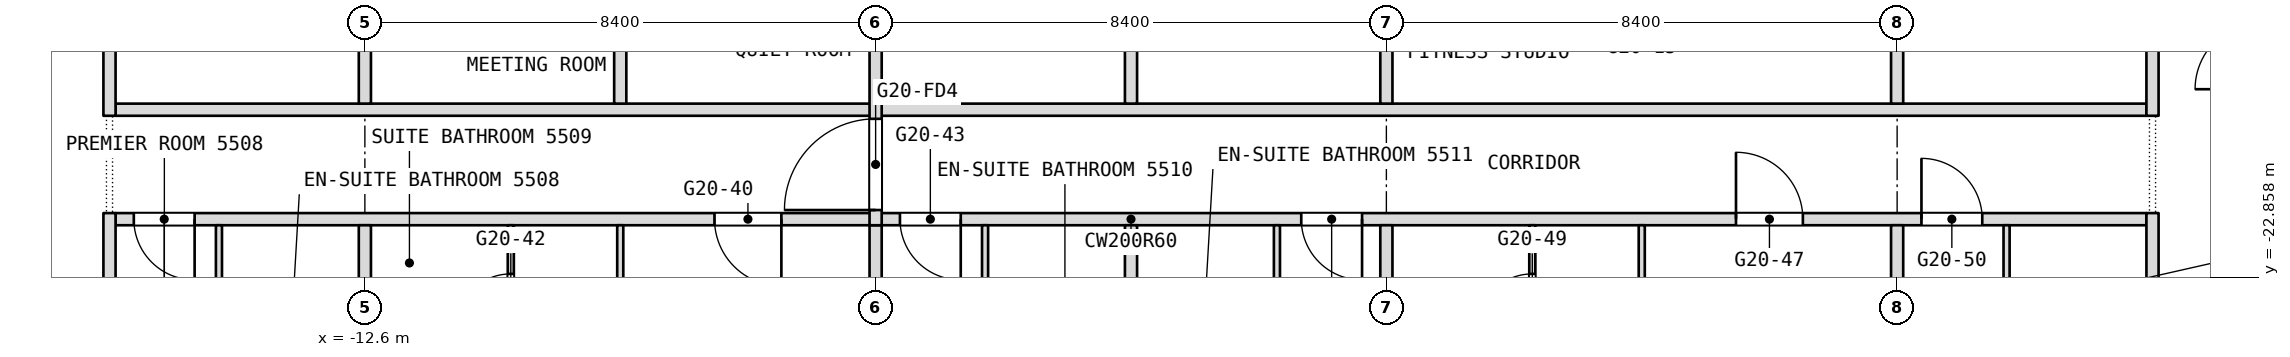
"""IFC4 building model, lengths in metres.
Left out: names, types, materials, properties, quantities, classifications, styles, units other than length and angle.
Written with IfcOpenShell. Run it as: python <this file> out.ifc"""

import sys

from ifc_helpers import new_model, si_unit, direction, frame, frame_2d, origin, place, context, subcontext, project, spatial, rectangle, extrude, element, fill, save


model = new_model("IFC4")
c1 = context("Model", 3, precision=1e-05, world=origin(), true_north=direction((0.0, 1.0)))
c2 = subcontext(c1, "Body", "Model", "MODEL_VIEW")
j1 = project(units=[si_unit("LENGTHUNIT", "METRE"), si_unit("PLANEANGLEUNIT", "RADIAN")], contexts=[c1])
p1 = place(None, origin())
s1 = spatial("IfcSite", under=j1, at=p1, CompositionType="ELEMENT")
p2 = place(p1, origin())
s2 = spatial("IfcBuilding", under=s1, at=p2, CompositionType="ELEMENT")
p3 = place(p2, frame((0.0, 0.0, 234.5)))
s3 = spatial("IfcBuildingStorey", under=s2, at=p3, CompositionType="ELEMENT", Elevation=234.5)
p4 = place(p3, frame((-16.7, -21.9, 0.0), z_axis=(0.0, 0.0, 1.0), x_axis=(1.0, 0.0, 0.0)))
e1 = element("IfcWall", 1, at=p4, inside=s3, PredefinedType="PARTITIONING", context=c2, shape_type="SweptSolid", body=[
    extrude(rectangle(XDim=33.4, YDim=0.2, at=frame_2d((16.7, 0.0))), origin(), (0.0, 0.0, 1.0), 3.34),
])
p5 = place(p4, frame((0.3, 0.0, 0.0)))
e2 = element("IfcOpeningElement", 2, at=p5, cuts=e1, PredefinedType="OPENING", context=c2, shape_type="SweptSolid", body=[
    extrude(rectangle(XDim=1.0, YDim=2.1, at=frame_2d((0.5, 1.05))), frame((0.0, 0.1, 0.0), z_axis=(0.0, -1.0, 0.0), x_axis=(1.0, 0.0, 0.0)), (0.0, 0.0, 1.0), 0.2),
])
p6 = place(p4, frame((9.85, 0.0, 0.0)))
e3 = element("IfcOpeningElement", 3, at=p6, cuts=e1, PredefinedType="OPENING", context=c2, shape_type="SweptSolid", body=[
    extrude(rectangle(XDim=1.1, YDim=2.1, at=frame_2d((0.55, 1.05))), frame((0.0, 0.1, 0.0), z_axis=(0.0, -1.0, 0.0), x_axis=(1.0, 0.0, 0.0)), (0.0, 0.0, 1.0), 0.2),
])
p7 = place(p4, frame((12.9, 0.0, 0.0)))
e4 = element("IfcOpeningElement", 4, at=p7, cuts=e1, PredefinedType="OPENING", context=c2, shape_type="SweptSolid", body=[
    extrude(rectangle(XDim=1.0, YDim=2.1, at=frame_2d((0.5, 1.05))), frame((0.0, 0.1, 0.0), z_axis=(0.0, -1.0, 0.0), x_axis=(1.0, 0.0, 0.0)), (0.0, 0.0, 1.0), 0.2),
])
p8 = place(p4, frame((19.5, 0.0, 0.0)))
e5 = element("IfcOpeningElement", 5, at=p8, cuts=e1, PredefinedType="OPENING", context=c2, shape_type="SweptSolid", body=[
    extrude(rectangle(XDim=1.0, YDim=2.1, at=frame_2d((0.5, 1.05))), frame((0.0, 0.1, 0.0), z_axis=(0.0, -1.0, 0.0), x_axis=(1.0, 0.0, 0.0)), (0.0, 0.0, 1.0), 0.2),
])
p9 = place(p4, frame((26.65, 0.0, 0.0)))
e6 = element("IfcOpeningElement", 6, at=p9, cuts=e1, PredefinedType="OPENING", context=c2, shape_type="SweptSolid", body=[
    extrude(rectangle(XDim=1.1, YDim=2.1, at=frame_2d((0.55, 1.05))), frame((0.0, 0.1, 0.0), z_axis=(0.0, -1.0, 0.0), x_axis=(1.0, 0.0, 0.0)), (0.0, 0.0, 1.0), 0.2),
])
p10 = place(p4, frame((29.7, 0.0, 0.0)))
e7 = element("IfcOpeningElement", 7, at=p10, cuts=e1, PredefinedType="OPENING", context=c2, shape_type="SweptSolid", body=[
    extrude(rectangle(XDim=1.0, YDim=2.1, at=frame_2d((0.5, 1.05))), frame((0.0, 0.1, 0.0), z_axis=(0.0, -1.0, 0.0), x_axis=(1.0, 0.0, 0.0)), (0.0, 0.0, 1.0), 0.2),
])
p11 = place(p3, frame((-16.7, -20.1, 0.0), z_axis=(0.0, 0.0, 1.0), x_axis=(1.0, 0.0, 0.0)))
e8 = element("IfcWall", 8, at=p11, inside=s3, PredefinedType="PARTITIONING", context=c2, shape_type="SweptSolid", body=[
    extrude(rectangle(XDim=33.4, YDim=0.2, at=frame_2d((16.7, 0.0))), origin(), (0.0, 0.0, 1.0), 3.34),
])
p12 = place(p3, frame((16.8, -27.229, 0.0), z_axis=(0.0, 0.0, 1.0), x_axis=(0.0, 1.0, 0.0)))
e9 = element("IfcWall", 9, at=p12, inside=s3, PredefinedType="PARTITIONING", context=c2, shape_type="SweptSolid", body=[
    extrude(rectangle(XDim=5.429, YDim=0.2, at=frame_2d((2.714, 0.0))), origin(), (0.0, 0.0, 1.0), 3.34),
])
p13 = place(p3, frame((16.8, -20.2, 0.0), z_axis=(0.0, 0.0, 1.0), x_axis=(0.0, 1.0, 0.0)))
e10 = element("IfcWall", 10, at=p13, inside=s3, PredefinedType="PARTITIONING", context=c2, shape_type="SweptSolid", body=[
    extrude(rectangle(XDim=6.8, YDim=0.2, at=frame_2d((3.4, 0.0))), origin(), (0.0, 0.0, 1.0), 3.34),
])
p14 = place(p3, frame((14.4, -25.35, 0.0), z_axis=(0.0, 0.0, 1.0), x_axis=(0.0, 1.0, 0.0)))
e11 = element("IfcWall", 11, at=p14, inside=s3, PredefinedType="PARTITIONING", context=c2, shape_type="SweptSolid", body=[
    extrude(rectangle(XDim=3.35, YDim=0.1, at=frame_2d((1.675, 0.0))), origin(), (0.0, 0.0, 1.0), 3.34),
])
p15 = place(p3, frame((12.6, -28.343, 0.0), z_axis=(0.0, 0.0, 1.0), x_axis=(0.0, 1.0, 0.0)))
e12 = element("IfcWall", 12, at=p15, inside=s3, PredefinedType="PARTITIONING", context=c2, shape_type="SweptSolid", body=[
    extrude(rectangle(XDim=6.343, YDim=0.2, at=frame_2d((3.171, 0.0))), origin(), (0.0, 0.0, 1.0), 3.34),
])
p16 = place(p3, frame((12.6, -20.0, 0.0), z_axis=(0.0, 0.0, 1.0), x_axis=(0.0, 1.0, 0.0)))
e13 = element("IfcWall", 13, at=p16, inside=s3, PredefinedType="PARTITIONING", context=c2, shape_type="SweptSolid", body=[
    extrude(rectangle(XDim=1.5, YDim=0.2, at=frame_2d((0.75, 0.0))), origin(), (0.0, 0.0, 1.0), 3.34),
])
p17 = place(p3, frame((8.4, -28.9, 0.0), z_axis=(0.0, 0.0, 1.0), x_axis=(0.0, 1.0, 0.0)))
e14 = element("IfcWall", 14, at=p17, inside=s3, PredefinedType="PARTITIONING", context=c2, shape_type="SweptSolid", body=[
    extrude(rectangle(XDim=6.9, YDim=0.1, at=frame_2d((3.45, 0.0))), origin(), (0.0, 0.0, 1.0), 3.34),
])
p18 = place(p17, frame((2.53, 0.0, 0.0)))
e15 = element("IfcOpeningElement", 15, at=p18, cuts=e14, PredefinedType="OPENING", context=c2, shape_type="SweptSolid", body=[
    extrude(rectangle(XDim=0.9, YDim=2.1, at=frame_2d((0.45, 1.05))), frame((0.0, 0.05, 0.0), z_axis=(0.0, -1.0, 0.0), x_axis=(1.0, 0.0, 0.0)), (0.0, 0.0, 1.0), 0.1),
])
p19 = place(p3, frame((6.6, -24.55, 0.0), z_axis=(0.0, 0.0, 1.0), x_axis=(0.0, 1.0, 0.0)))
e16 = element("IfcWall", 16, at=p19, inside=s3, PredefinedType="PARTITIONING", context=c2, shape_type="SweptSolid", body=[
    extrude(rectangle(XDim=2.55, YDim=0.1, at=frame_2d((1.275, 0.0))), origin(), (0.0, 0.0, 1.0), 3.34),
])
p20 = place(p19, frame((0.85, 0.0, 0.0)))
e17 = element("IfcOpeningElement", 17, at=p20, cuts=e16, PredefinedType="OPENING", context=c2, shape_type="SweptSolid", body=[
    extrude(rectangle(XDim=0.9, YDim=2.1, at=frame_2d((0.45, 1.05))), frame((0.0, 0.05, 0.0), z_axis=(0.0, -1.0, 0.0), x_axis=(1.0, 0.0, 0.0)), (0.0, 0.0, 1.0), 0.1),
])
p21 = place(p3, frame((4.2, -28.9, 0.0), z_axis=(0.0, 0.0, 1.0), x_axis=(0.0, 1.0, 0.0)))
e18 = element("IfcWall", 18, at=p21, inside=s3, PredefinedType="PARTITIONING", context=c2, shape_type="SweptSolid", body=[
    extrude(rectangle(XDim=6.9, YDim=0.2, at=frame_2d((3.45, 0.0))), origin(), (0.0, 0.0, 1.0), 3.34),
])
p22 = place(p3, frame((4.2, -20.0, 0.0), z_axis=(0.0, 0.0, 1.0), x_axis=(0.0, 1.0, 0.0)))
e19 = element("IfcWall", 19, at=p22, inside=s3, PredefinedType="PARTITIONING", context=c2, shape_type="SweptSolid", body=[
    extrude(rectangle(XDim=6.4, YDim=0.2, at=frame_2d((3.2, 0.0))), origin(), (0.0, 0.0, 1.0), 3.34),
])
p23 = place(p3, frame((2.4, -25.25, 0.0), z_axis=(0.0, 0.0, 1.0), x_axis=(0.0, 1.0, 0.0)))
e20 = element("IfcWall", 20, at=p23, inside=s3, PredefinedType="PARTITIONING", context=c2, shape_type="SweptSolid", body=[
    extrude(rectangle(XDim=3.25, YDim=0.1, at=frame_2d((1.625, 0.0))), origin(), (0.0, 0.0, 1.0), 3.34),
])
p24 = place(p3, frame((0.0, -28.9, 0.0), z_axis=(0.0, 0.0, 1.0), x_axis=(0.0, 1.0, 0.0)))
e21 = element("IfcWall", 21, at=p24, inside=s3, PredefinedType="PARTITIONING", context=c2, shape_type="SweptSolid", body=[
    extrude(rectangle(XDim=6.9, YDim=0.2, at=frame_2d((3.45, 0.0))), origin(), (0.0, 0.0, 1.0), 3.34),
])
p25 = place(p3, frame((0.0, -20.0, 0.0), z_axis=(0.0, 0.0, 1.0), x_axis=(0.0, 1.0, 0.0)))
e22 = element("IfcWall", 22, at=p25, inside=s3, PredefinedType="PARTITIONING", context=c2, shape_type="SweptSolid", body=[
    extrude(rectangle(XDim=6.4, YDim=0.2, at=frame_2d((3.2, 0.0))), origin(), (0.0, 0.0, 1.0), 3.34),
])
p26 = place(p3, frame((-2.4, -24.95, 0.0), z_axis=(0.0, 0.0, 1.0), x_axis=(0.0, 1.0, 0.0)))
e23 = element("IfcWall", 23, at=p26, inside=s3, PredefinedType="PARTITIONING", context=c2, shape_type="SweptSolid", body=[
    extrude(rectangle(XDim=2.95, YDim=0.1, at=frame_2d((1.475, 0.0))), origin(), (0.0, 0.0, 1.0), 3.34),
])
p27 = place(p3, frame((-4.2, -28.9, 0.0), z_axis=(0.0, 0.0, 1.0), x_axis=(0.0, 1.0, 0.0)))
e24 = element("IfcWall", 24, at=p27, inside=s3, PredefinedType="PARTITIONING", context=c2, shape_type="SweptSolid", body=[
    extrude(rectangle(XDim=6.9, YDim=0.2, at=frame_2d((3.45, 0.0))), origin(), (0.0, 0.0, 1.0), 3.34),
])
p28 = place(p3, frame((-4.2, -22.0, 0.0), z_axis=(0.0, 0.0, 1.0), x_axis=(0.0, 1.0, 0.0)))
e25 = element("IfcWall", 25, at=p28, inside=s3, PredefinedType="PARTITIONING", context=c2, shape_type="SweptSolid", body=[
    extrude(rectangle(XDim=8.4, YDim=0.2, at=frame_2d((4.2, 0.0))), origin(), (0.0, 0.0, 1.0), 3.34),
])
p29 = place(p28, frame((0.25, 0.0, 0.0)))
e26 = element("IfcOpeningElement", 26, at=p29, cuts=e25, PredefinedType="OPENING", context=c2, shape_type="SweptSolid", body=[
    extrude(rectangle(XDim=1.5, YDim=2.1, at=frame_2d((0.75, 1.05))), frame((0.0, 0.1, 0.0), z_axis=(0.0, -1.0, 0.0), x_axis=(1.0, 0.0, 0.0)), (0.0, 0.0, 1.0), 0.2),
])
p30 = place(p3, frame((-8.4, -28.9, 0.0), z_axis=(0.0, 0.0, 1.0), x_axis=(0.0, 1.0, 0.0)))
e27 = element("IfcWall", 27, at=p30, inside=s3, PredefinedType="PARTITIONING", context=c2, shape_type="SweptSolid", body=[
    extrude(rectangle(XDim=6.9, YDim=0.1, at=frame_2d((3.45, 0.0))), origin(), (0.0, 0.0, 1.0), 3.34),
])
p31 = place(p30, frame((2.53, 0.0, 0.0)))
e28 = element("IfcOpeningElement", 28, at=p31, cuts=e27, PredefinedType="OPENING", context=c2, shape_type="SweptSolid", body=[
    extrude(rectangle(XDim=0.9, YDim=2.1, at=frame_2d((0.45, 1.05))), frame((0.0, 0.05, 0.0), z_axis=(0.0, -1.0, 0.0), x_axis=(1.0, 0.0, 0.0)), (0.0, 0.0, 1.0), 0.1),
])
p32 = place(p3, frame((-8.4, -20.0, 0.0), z_axis=(0.0, 0.0, 1.0), x_axis=(0.0, 1.0, 0.0)))
e29 = element("IfcWall", 29, at=p32, inside=s3, PredefinedType="PARTITIONING", context=c2, shape_type="SweptSolid", body=[
    extrude(rectangle(XDim=1.5, YDim=0.2, at=frame_2d((0.75, 0.0))), origin(), (0.0, 0.0, 1.0), 3.34),
])
p33 = place(p3, frame((-10.2, -24.55, 0.0), z_axis=(0.0, 0.0, 1.0), x_axis=(0.0, 1.0, 0.0)))
e30 = element("IfcWall", 30, at=p33, inside=s3, PredefinedType="PARTITIONING", context=c2, shape_type="SweptSolid", body=[
    extrude(rectangle(XDim=2.55, YDim=0.1, at=frame_2d((1.275, 0.0))), origin(), (0.0, 0.0, 1.0), 3.34),
])
p34 = place(p33, frame((0.85, 0.0, 0.0)))
e31 = element("IfcOpeningElement", 31, at=p34, cuts=e30, PredefinedType="OPENING", context=c2, shape_type="SweptSolid", body=[
    extrude(rectangle(XDim=0.9, YDim=2.1, at=frame_2d((0.45, 1.05))), frame((0.0, 0.05, 0.0), z_axis=(0.0, -1.0, 0.0), x_axis=(1.0, 0.0, 0.0)), (0.0, 0.0, 1.0), 0.1),
])
p35 = place(p3, frame((-12.6, -28.343, 0.0), z_axis=(0.0, 0.0, 1.0), x_axis=(0.0, 1.0, 0.0)))
e32 = element("IfcWall", 32, at=p35, inside=s3, PredefinedType="PARTITIONING", context=c2, shape_type="SweptSolid", body=[
    extrude(rectangle(XDim=6.343, YDim=0.2, at=frame_2d((3.171, 0.0))), origin(), (0.0, 0.0, 1.0), 3.34),
])
p36 = place(p3, frame((-12.6, -20.0, 0.0), z_axis=(0.0, 0.0, 1.0), x_axis=(0.0, 1.0, 0.0)))
e33 = element("IfcWall", 33, at=p36, inside=s3, PredefinedType="PARTITIONING", context=c2, shape_type="SweptSolid", body=[
    extrude(rectangle(XDim=1.5, YDim=0.2, at=frame_2d((0.75, 0.0))), origin(), (0.0, 0.0, 1.0), 3.34),
])
p37 = place(p3, frame((-15.0, -25.85, 0.0), z_axis=(0.0, 0.0, 1.0), x_axis=(0.0, 1.0, 0.0)))
e34 = element("IfcWall", 34, at=p37, inside=s3, PredefinedType="PARTITIONING", context=c2, shape_type="SweptSolid", body=[
    extrude(rectangle(XDim=3.85, YDim=0.1, at=frame_2d((1.925, 0.0))), origin(), (0.0, 0.0, 1.0), 3.34),
])
p38 = place(p3, frame((-16.8, -27.229, 0.0), z_axis=(0.0, 0.0, 1.0), x_axis=(0.0, 1.0, 0.0)))
e35 = element("IfcWall", 35, at=p38, inside=s3, PredefinedType="PARTITIONING", context=c2, shape_type="SweptSolid", body=[
    extrude(rectangle(XDim=5.429, YDim=0.2, at=frame_2d((2.714, 0.0))), origin(), (0.0, 0.0, 1.0), 3.34),
])
p39 = place(p3, frame((-16.8, -20.2, 0.0), z_axis=(0.0, 0.0, 1.0), x_axis=(0.0, 1.0, 0.0)))
e36 = element("IfcWall", 36, at=p39, inside=s3, PredefinedType="PARTITIONING", context=c2, shape_type="SweptSolid", body=[
    extrude(rectangle(XDim=6.8, YDim=0.2, at=frame_2d((3.4, 0.0))), origin(), (0.0, 0.0, 1.0), 3.34),
])
p40 = place(p5, origin())
e37 = element("IfcDoor", 37, at=p40, inside=s3, OperationType="SINGLE_SWING_RIGHT", PredefinedType="DOOR", context=c2, shape_type="SweptSolid", body=[
    extrude(rectangle(XDim=1.0, YDim=2.1, at=frame_2d((0.5, 1.05))), frame((0.0, 0.025, 0.0), z_axis=(0.0, -1.0, 0.0), x_axis=(1.0, 0.0, 0.0)), (0.0, 0.0, 1.0), 0.05),
])
fill(e2, e37)
p41 = place(p6, origin())
e38 = element("IfcDoor", 38, at=p41, inside=s3, OperationType="SINGLE_SWING_RIGHT", PredefinedType="DOOR", context=c2, shape_type="SweptSolid", body=[
    extrude(rectangle(XDim=1.1, YDim=2.1, at=frame_2d((0.55, 1.05))), frame((0.0, 0.025, 0.0), z_axis=(0.0, -1.0, 0.0), x_axis=(1.0, 0.0, 0.0)), (0.0, 0.0, 1.0), 0.05),
])
fill(e3, e38)
p42 = place(p7, origin())
e39 = element("IfcDoor", 39, at=p42, inside=s3, OperationType="SINGLE_SWING_LEFT", PredefinedType="DOOR", context=c2, shape_type="SweptSolid", body=[
    extrude(rectangle(XDim=1.0, YDim=2.1, at=frame_2d((0.5, 1.05))), frame((0.0, 0.025, 0.0), z_axis=(0.0, -1.0, 0.0), x_axis=(1.0, 0.0, 0.0)), (0.0, 0.0, 1.0), 0.05),
])
fill(e4, e39)
p43 = place(p8, origin())
e40 = element("IfcDoor", 40, at=p43, inside=s3, OperationType="SINGLE_SWING_LEFT", PredefinedType="DOOR", context=c2, shape_type="SweptSolid", body=[
    extrude(rectangle(XDim=1.0, YDim=2.1, at=frame_2d((0.5, 1.05))), frame((0.0, 0.025, 0.0), z_axis=(0.0, -1.0, 0.0), x_axis=(1.0, 0.0, 0.0)), (0.0, 0.0, 1.0), 0.05),
])
fill(e5, e40)
p44 = place(p9, origin())
e41 = element("IfcDoor", 41, at=p44, inside=s3, OperationType="SINGLE_SWING_LEFT", PredefinedType="DOOR", context=c2, shape_type="SweptSolid", body=[
    extrude(rectangle(XDim=1.1, YDim=2.1, at=frame_2d((0.55, 1.05))), frame((0.0, 0.025, 0.0), z_axis=(0.0, -1.0, 0.0), x_axis=(1.0, 0.0, 0.0)), (0.0, 0.0, 1.0), 0.05),
])
fill(e6, e41)
p45 = place(p10, origin())
e42 = element("IfcDoor", 42, at=p45, inside=s3, OperationType="SINGLE_SWING_RIGHT", PredefinedType="DOOR", context=c2, shape_type="SweptSolid", body=[
    extrude(rectangle(XDim=1.0, YDim=2.1, at=frame_2d((0.5, 1.05))), frame((0.0, 0.025, 0.0), z_axis=(0.0, -1.0, 0.0), x_axis=(1.0, 0.0, 0.0)), (0.0, 0.0, 1.0), 0.05),
])
fill(e7, e42)
p46 = place(p20, origin())
e43 = element("IfcDoor", 43, at=p46, inside=s3, OperationType="SINGLE_SWING_RIGHT", PredefinedType="DOOR", context=c2, shape_type="SweptSolid", body=[
    extrude(rectangle(XDim=0.9, YDim=2.1, at=frame_2d((0.45, 1.05))), frame((0.0, 0.025, 0.0), z_axis=(0.0, -1.0, 0.0), x_axis=(1.0, 0.0, 0.0)), (0.0, 0.0, 1.0), 0.05),
])
fill(e17, e43)
p47 = place(p34, origin())
e44 = element("IfcDoor", 44, at=p47, inside=s3, OperationType="SINGLE_SWING_RIGHT", PredefinedType="DOOR", context=c2, shape_type="SweptSolid", body=[
    extrude(rectangle(XDim=0.9, YDim=2.1, at=frame_2d((0.45, 1.05))), frame((0.0, 0.025, 0.0), z_axis=(0.0, -1.0, 0.0), x_axis=(1.0, 0.0, 0.0)), (0.0, 0.0, 1.0), 0.05),
])
fill(e31, e44)
p48 = place(p29, origin())
e45 = element("IfcDoor", 45, at=p48, inside=s3, OperationType="DOUBLE_DOOR_DOUBLE_SWING", PredefinedType="DOOR", context=c2, shape_type="SweptSolid", body=[
    extrude(rectangle(XDim=1.5, YDim=2.1, at=frame_2d((0.75, 1.05))), frame((0.0, 0.025, 0.0), z_axis=(0.0, -1.0, 0.0), x_axis=(1.0, 0.0, 0.0)), (0.0, 0.0, 1.0), 0.05),
])
fill(e26, e45)
save(model, sys.argv[1])
